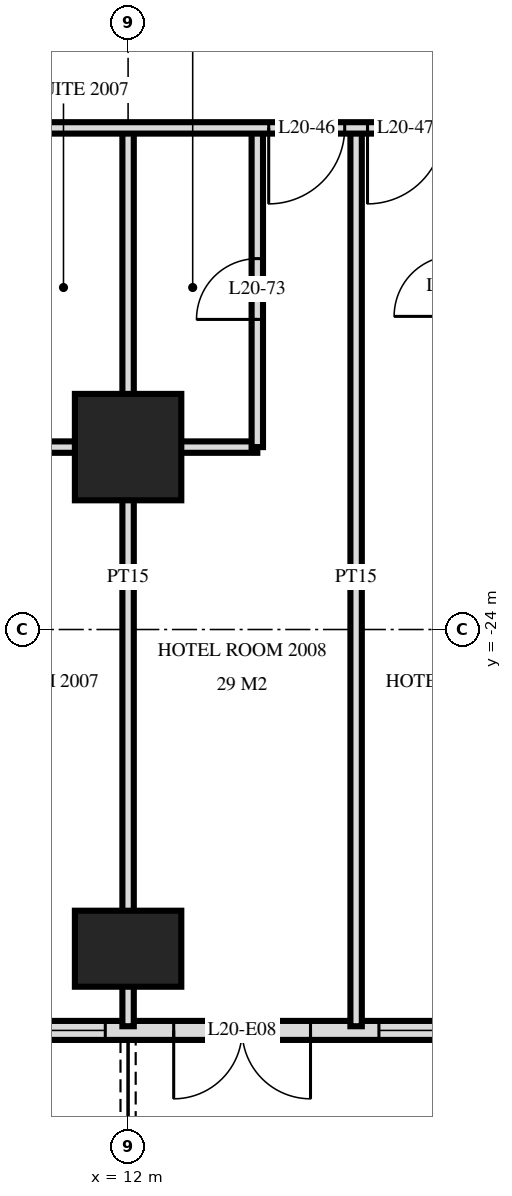
"""IFC4 building model, lengths in metres.
Left out: names, types, materials, properties, quantities, classifications, styles, units other than length and angle.
Written with IfcOpenShell. Run it as: python <this file> out.ifc"""

import sys

from ifc_helpers import new_model, si_unit, direction, frame, frame_2d, origin, origin_2d, place, context, subcontext, project, spatial, rectangle, extrude, element, fill, save


model = new_model("IFC4")
c1 = context("Model", 3, precision=1e-05, world=origin(), true_north=direction((0.0, 1.0)))
c2 = subcontext(c1, "Body", "Model", "MODEL_VIEW")
j1 = project(units=[si_unit("LENGTHUNIT", "METRE"), si_unit("PLANEANGLEUNIT", "RADIAN")], contexts=[c1])
p1 = place(None, origin())
s1 = spatial("IfcSite", under=j1, at=p1, CompositionType="ELEMENT")
p2 = place(p1, origin())
s2 = spatial("IfcBuilding", under=s1, at=p2, CompositionType="ELEMENT")
p3 = place(p2, frame((0.0, 0.0, 81.6)))
s3 = spatial("IfcBuildingStorey", under=s2, at=p3, CompositionType="ELEMENT", Elevation=81.6)
p4 = place(p3, frame((12.0, -28.2, 0.0), z_axis=(0.0, 0.0, 1.0), x_axis=(1.0, 0.0, 0.0)))
e1 = element("IfcColumn", 1, at=p4, inside=s3, PredefinedType="COLUMN", context=c2, shape_type="SweptSolid", body=[
    extrude(rectangle(XDim=1.4, YDim=1.0, at=origin_2d()), origin(), (0.0, 0.0, 1.0), 3.6),
])
p5 = place(p3, frame((12.0, -21.6, 0.0), z_axis=(0.0, 0.0, 1.0), x_axis=(1.0, 0.0, 0.0)))
e2 = element("IfcColumn", 2, at=p5, inside=s3, PredefinedType="COLUMN", context=c2, shape_type="SweptSolid", body=[
    extrude(rectangle(XDim=1.4, YDim=1.4, at=origin_2d()), origin(), (0.0, 0.0, 1.0), 3.6),
])
p6 = place(p3, frame((-28.775, -29.275, 0.0), z_axis=(0.0, 0.0, 1.0), x_axis=(1.0, 0.0, 0.0)))
e3 = element("IfcWall", 3, at=p6, inside=s3, PredefinedType="SOLIDWALL", context=c2, shape_type="SweptSolid", body=[
    extrude(rectangle(XDim=57.551, YDim=0.25, at=frame_2d((28.775, 0.0))), origin(), (0.0, 0.0, 1.0), 3.32),
])
p7 = place(p6, frame((0.575, 0.0, 0.0)))
e4 = element("IfcOpeningElement", 4, at=p7, cuts=e3, PredefinedType="OPENING", context=c2, shape_type="SweptSolid", body=[
    extrude(rectangle(XDim=1.8, YDim=2.4, at=frame_2d((0.9, 1.2))), frame((0.0, 0.135, 0.0), z_axis=(0.0, -1.0, 0.0), x_axis=(1.0, 0.0, 0.0)), (0.0, 0.0, 1.0), 0.27),
])
p8 = place(p6, frame((5.375, 0.0, 0.0)))
e5 = element("IfcOpeningElement", 5, at=p8, cuts=e3, PredefinedType="OPENING", context=c2, shape_type="SweptSolid", body=[
    extrude(rectangle(XDim=1.8, YDim=2.4, at=frame_2d((0.9, 1.2))), frame((0.0, 0.135, 0.0), z_axis=(0.0, -1.0, 0.0), x_axis=(1.0, 0.0, 0.0)), (0.0, 0.0, 1.0), 0.27),
])
p9 = place(p6, frame((8.075, 0.0, 0.3)))
e6 = element("IfcOpeningElement", 6, at=p9, cuts=e3, PredefinedType="OPENING", context=c2, shape_type="SweptSolid", body=[
    extrude(rectangle(XDim=2.4, YDim=2.1, at=frame_2d((1.2, 1.05))), frame((0.0, 0.135, 0.0), z_axis=(0.0, -1.0, 0.0), x_axis=(1.0, 0.0, 0.0)), (0.0, 0.0, 1.0), 0.27),
])
p10 = place(p6, frame((12.875, 0.0, 0.0)))
e7 = element("IfcOpeningElement", 7, at=p10, cuts=e3, PredefinedType="OPENING", context=c2, shape_type="SweptSolid", body=[
    extrude(rectangle(XDim=1.8, YDim=2.4, at=frame_2d((0.9, 1.2))), frame((0.0, 0.135, 0.0), z_axis=(0.0, -1.0, 0.0), x_axis=(1.0, 0.0, 0.0)), (0.0, 0.0, 1.0), 0.27),
])
p11 = place(p6, frame((17.375, 0.0, 0.0)))
e8 = element("IfcOpeningElement", 8, at=p11, cuts=e3, PredefinedType="OPENING", context=c2, shape_type="SweptSolid", body=[
    extrude(rectangle(XDim=1.8, YDim=2.4, at=frame_2d((0.9, 1.2))), frame((0.0, 0.135, 0.0), z_axis=(0.0, -1.0, 0.0), x_axis=(1.0, 0.0, 0.0)), (0.0, 0.0, 1.0), 0.27),
])
p12 = place(p6, frame((20.075, 0.0, 0.3)))
e9 = element("IfcOpeningElement", 9, at=p12, cuts=e3, PredefinedType="OPENING", context=c2, shape_type="SweptSolid", body=[
    extrude(rectangle(XDim=2.4, YDim=2.1, at=frame_2d((1.2, 1.05))), frame((0.0, 0.135, 0.0), z_axis=(0.0, -1.0, 0.0), x_axis=(1.0, 0.0, 0.0)), (0.0, 0.0, 1.0), 0.27),
])
p13 = place(p6, frame((23.075, 0.0, 0.3)))
e10 = element("IfcOpeningElement", 10, at=p13, cuts=e3, PredefinedType="OPENING", context=c2, shape_type="SweptSolid", body=[
    extrude(rectangle(XDim=2.4, YDim=2.1, at=frame_2d((1.2, 1.05))), frame((0.0, 0.135, 0.0), z_axis=(0.0, -1.0, 0.0), x_axis=(1.0, 0.0, 0.0)), (0.0, 0.0, 1.0), 0.27),
])
p14 = place(p6, frame((26.375, 0.0, 0.0)))
e11 = element("IfcOpeningElement", 11, at=p14, cuts=e3, PredefinedType="OPENING", context=c2, shape_type="SweptSolid", body=[
    extrude(rectangle(XDim=1.8, YDim=2.4, at=frame_2d((0.9, 1.2))), frame((0.0, 0.135, 0.0), z_axis=(0.0, -1.0, 0.0), x_axis=(1.0, 0.0, 0.0)), (0.0, 0.0, 1.0), 0.27),
])
p15 = place(p6, frame((29.075, 0.0, 0.3)))
e12 = element("IfcOpeningElement", 12, at=p15, cuts=e3, PredefinedType="OPENING", context=c2, shape_type="SweptSolid", body=[
    extrude(rectangle(XDim=2.4, YDim=2.1, at=frame_2d((1.2, 1.05))), frame((0.0, 0.135, 0.0), z_axis=(0.0, -1.0, 0.0), x_axis=(1.0, 0.0, 0.0)), (0.0, 0.0, 1.0), 0.27),
])
p16 = place(p6, frame((32.375, 0.0, 0.0)))
e13 = element("IfcOpeningElement", 13, at=p16, cuts=e3, PredefinedType="OPENING", context=c2, shape_type="SweptSolid", body=[
    extrude(rectangle(XDim=1.8, YDim=2.4, at=frame_2d((0.9, 1.2))), frame((0.0, 0.135, 0.0), z_axis=(0.0, -1.0, 0.0), x_axis=(1.0, 0.0, 0.0)), (0.0, 0.0, 1.0), 0.27),
])
p17 = place(p6, frame((35.375, 0.0, 0.0)))
e14 = element("IfcOpeningElement", 14, at=p17, cuts=e3, PredefinedType="OPENING", context=c2, shape_type="SweptSolid", body=[
    extrude(rectangle(XDim=1.8, YDim=2.4, at=frame_2d((0.9, 1.2))), frame((0.0, 0.135, 0.0), z_axis=(0.0, -1.0, 0.0), x_axis=(1.0, 0.0, 0.0)), (0.0, 0.0, 1.0), 0.27),
])
p18 = place(p6, frame((38.075, 0.0, 0.3)))
e15 = element("IfcOpeningElement", 15, at=p18, cuts=e3, PredefinedType="OPENING", context=c2, shape_type="SweptSolid", body=[
    extrude(rectangle(XDim=2.4, YDim=2.1, at=frame_2d((1.2, 1.05))), frame((0.0, 0.135, 0.0), z_axis=(0.0, -1.0, 0.0), x_axis=(1.0, 0.0, 0.0)), (0.0, 0.0, 1.0), 0.27),
])
p19 = place(p6, frame((41.375, 0.0, 0.0)))
e16 = element("IfcOpeningElement", 16, at=p19, cuts=e3, PredefinedType="OPENING", context=c2, shape_type="SweptSolid", body=[
    extrude(rectangle(XDim=1.8, YDim=2.4, at=frame_2d((0.9, 1.2))), frame((0.0, 0.135, 0.0), z_axis=(0.0, -1.0, 0.0), x_axis=(1.0, 0.0, 0.0)), (0.0, 0.0, 1.0), 0.27),
])
p20 = place(p6, frame((44.075, 0.0, 0.3)))
e17 = element("IfcOpeningElement", 17, at=p20, cuts=e3, PredefinedType="OPENING", context=c2, shape_type="SweptSolid", body=[
    extrude(rectangle(XDim=2.4, YDim=2.1, at=frame_2d((1.2, 1.05))), frame((0.0, 0.135, 0.0), z_axis=(0.0, -1.0, 0.0), x_axis=(1.0, 0.0, 0.0)), (0.0, 0.0, 1.0), 0.27),
])
p21 = place(p6, frame((47.075, 0.0, 0.3)))
e18 = element("IfcOpeningElement", 18, at=p21, cuts=e3, PredefinedType="OPENING", context=c2, shape_type="SweptSolid", body=[
    extrude(rectangle(XDim=2.4, YDim=2.1, at=frame_2d((1.2, 1.05))), frame((0.0, 0.135, 0.0), z_axis=(0.0, -1.0, 0.0), x_axis=(1.0, 0.0, 0.0)), (0.0, 0.0, 1.0), 0.27),
])
p22 = place(p6, frame((50.375, 0.0, 0.0)))
e19 = element("IfcOpeningElement", 19, at=p22, cuts=e3, PredefinedType="OPENING", context=c2, shape_type="SweptSolid", body=[
    extrude(rectangle(XDim=1.8, YDim=2.4, at=frame_2d((0.9, 1.2))), frame((0.0, 0.135, 0.0), z_axis=(0.0, -1.0, 0.0), x_axis=(1.0, 0.0, 0.0)), (0.0, 0.0, 1.0), 0.27),
])
p23 = place(p6, frame((53.375, 0.0, 0.0)))
e20 = element("IfcOpeningElement", 20, at=p23, cuts=e3, PredefinedType="OPENING", context=c2, shape_type="SweptSolid", body=[
    extrude(rectangle(XDim=1.8, YDim=2.4, at=frame_2d((0.9, 1.2))), frame((0.0, 0.135, 0.0), z_axis=(0.0, -1.0, 0.0), x_axis=(1.0, 0.0, 0.0)), (0.0, 0.0, 1.0), 0.27),
])
p24 = place(p3, frame((15.0, -29.22, 0.0), z_axis=(0.0, 0.0, 1.0), x_axis=(0.0, 1.0, 0.0)))
e21 = element("IfcWall", 21, at=p24, inside=s3, PredefinedType="PARTITIONING", context=c2, shape_type="SweptSolid", body=[
    extrude(rectangle(XDim=11.82, YDim=0.15, at=frame_2d((5.91, 0.0))), origin(), (0.0, 0.0, 1.0), 3.32),
])
p25 = place(p3, frame((13.7, -21.6, 0.0), z_axis=(0.0, 0.0, 1.0), x_axis=(0.0, 1.0, 0.0)))
e22 = element("IfcWall", 22, at=p25, inside=s3, PredefinedType="PARTITIONING", context=c2, shape_type="SweptSolid", body=[
    extrude(rectangle(XDim=4.2, YDim=0.15, at=frame_2d((2.1, 0.0))), origin(), (0.0, 0.0, 1.0), 3.32),
])
p26 = place(p25, frame((1.68, 0.0, 0.0)))
e23 = element("IfcOpeningElement", 23, at=p26, cuts=e22, PredefinedType="OPENING", context=c2, shape_type="SweptSolid", body=[
    extrude(rectangle(XDim=0.8, YDim=2.1, at=frame_2d((0.4, 1.05))), frame((0.0, 0.085, 0.0), z_axis=(0.0, -1.0, 0.0), x_axis=(1.0, 0.0, 0.0)), (0.0, 0.0, 1.0), 0.17),
])
p27 = place(p3, frame((12.0, -29.22, 0.0), z_axis=(0.0, 0.0, 1.0), x_axis=(0.0, 1.0, 0.0)))
e24 = element("IfcWall", 24, at=p27, inside=s3, PredefinedType="PARTITIONING", context=c2, shape_type="SweptSolid", body=[
    extrude(rectangle(XDim=11.82, YDim=0.15, at=frame_2d((5.91, 0.0))), origin(), (0.0, 0.0, 1.0), 3.32),
])
p28 = place(p3, frame((10.3, -21.6, 0.0), z_axis=(0.0, 0.0, 1.0), x_axis=(1.0, 0.0, 0.0)))
e25 = element("IfcWall", 25, at=p28, inside=s3, PredefinedType="PARTITIONING", context=c2, shape_type="SweptSolid", body=[
    extrude(rectangle(XDim=3.4, YDim=0.15, at=frame_2d((1.7, 0.0))), origin(), (0.0, 0.0, 1.0), 3.32),
])
p29 = place(p3, frame((-33.12, -17.4, 0.0), z_axis=(0.0, 0.0, 1.0), x_axis=(1.0, 0.0, 0.0)))
e26 = element("IfcWall", 26, at=p29, inside=s3, PredefinedType="PARTITIONING", context=c2, shape_type="SweptSolid", body=[
    extrude(rectangle(XDim=66.24, YDim=0.15, at=frame_2d((33.12, 0.0))), origin(), (0.0, 0.0, 1.0), 3.32),
])
p30 = place(p29, frame((9.27, 0.0, 0.0)))
e27 = element("IfcOpeningElement", 27, at=p30, cuts=e26, PredefinedType="OPENING", context=c2, shape_type="SweptSolid", body=[
    extrude(rectangle(XDim=1.0, YDim=2.1, at=frame_2d((0.5, 1.05))), frame((0.0, 0.085, 0.0), z_axis=(0.0, -1.0, 0.0), x_axis=(1.0, 0.0, 0.0)), (0.0, 0.0, 1.0), 0.17),
])
p31 = place(p29, frame((13.97, 0.0, 0.0)))
e28 = element("IfcOpeningElement", 28, at=p31, cuts=e26, PredefinedType="OPENING", context=c2, shape_type="SweptSolid", body=[
    extrude(rectangle(XDim=1.0, YDim=2.1, at=frame_2d((0.5, 1.05))), frame((0.0, 0.085, 0.0), z_axis=(0.0, -1.0, 0.0), x_axis=(1.0, 0.0, 0.0)), (0.0, 0.0, 1.0), 0.17),
])
p32 = place(p29, frame((17.62, 0.0, 0.0)))
e29 = element("IfcOpeningElement", 29, at=p32, cuts=e26, PredefinedType="OPENING", context=c2, shape_type="SweptSolid", body=[
    extrude(rectangle(XDim=1.0, YDim=2.1, at=frame_2d((0.5, 1.05))), frame((0.0, 0.085, 0.0), z_axis=(0.0, -1.0, 0.0), x_axis=(1.0, 0.0, 0.0)), (0.0, 0.0, 1.0), 0.17),
])
p33 = place(p29, frame((21.27, 0.0, 0.0)))
e30 = element("IfcOpeningElement", 30, at=p33, cuts=e26, PredefinedType="OPENING", context=c2, shape_type="SweptSolid", body=[
    extrude(rectangle(XDim=1.0, YDim=2.1, at=frame_2d((0.5, 1.05))), frame((0.0, 0.085, 0.0), z_axis=(0.0, -1.0, 0.0), x_axis=(1.0, 0.0, 0.0)), (0.0, 0.0, 1.0), 0.17),
])
p34 = place(p29, frame((25.97, 0.0, 0.0)))
e31 = element("IfcOpeningElement", 31, at=p34, cuts=e26, PredefinedType="OPENING", context=c2, shape_type="SweptSolid", body=[
    extrude(rectangle(XDim=1.0, YDim=2.1, at=frame_2d((0.5, 1.05))), frame((0.0, 0.085, 0.0), z_axis=(0.0, -1.0, 0.0), x_axis=(1.0, 0.0, 0.0)), (0.0, 0.0, 1.0), 0.17),
])
p35 = place(p29, frame((35.62, 0.0, 0.0)))
e32 = element("IfcOpeningElement", 32, at=p35, cuts=e26, PredefinedType="OPENING", context=c2, shape_type="SweptSolid", body=[
    extrude(rectangle(XDim=1.0, YDim=2.1, at=frame_2d((0.5, 1.05))), frame((0.0, 0.085, 0.0), z_axis=(0.0, -1.0, 0.0), x_axis=(1.0, 0.0, 0.0)), (0.0, 0.0, 1.0), 0.17),
])
p36 = place(p29, frame((40.97, 0.0, 0.0)))
e33 = element("IfcOpeningElement", 33, at=p36, cuts=e26, PredefinedType="OPENING", context=c2, shape_type="SweptSolid", body=[
    extrude(rectangle(XDim=1.0, YDim=2.1, at=frame_2d((0.5, 1.05))), frame((0.0, 0.085, 0.0), z_axis=(0.0, -1.0, 0.0), x_axis=(1.0, 0.0, 0.0)), (0.0, 0.0, 1.0), 0.17),
])
p37 = place(p29, frame((42.27, 0.0, 0.0)))
e34 = element("IfcOpeningElement", 34, at=p37, cuts=e26, PredefinedType="OPENING", context=c2, shape_type="SweptSolid", body=[
    extrude(rectangle(XDim=1.0, YDim=2.1, at=frame_2d((0.5, 1.05))), frame((0.0, 0.085, 0.0), z_axis=(0.0, -1.0, 0.0), x_axis=(1.0, 0.0, 0.0)), (0.0, 0.0, 1.0), 0.17),
])
p38 = place(p29, frame((46.97, 0.0, 0.0)))
e35 = element("IfcOpeningElement", 35, at=p38, cuts=e26, PredefinedType="OPENING", context=c2, shape_type="SweptSolid", body=[
    extrude(rectangle(XDim=1.0, YDim=2.1, at=frame_2d((0.5, 1.05))), frame((0.0, 0.085, 0.0), z_axis=(0.0, -1.0, 0.0), x_axis=(1.0, 0.0, 0.0)), (0.0, 0.0, 1.0), 0.17),
])
p39 = place(p29, frame((48.27, 0.0, 0.0)))
e36 = element("IfcOpeningElement", 36, at=p39, cuts=e26, PredefinedType="OPENING", context=c2, shape_type="SweptSolid", body=[
    extrude(rectangle(XDim=1.0, YDim=2.1, at=frame_2d((0.5, 1.05))), frame((0.0, 0.085, 0.0), z_axis=(0.0, -1.0, 0.0), x_axis=(1.0, 0.0, 0.0)), (0.0, 0.0, 1.0), 0.17),
])
p40 = place(p29, frame((1.87, 0.0, 0.0)))
e37 = element("IfcOpeningElement", 37, at=p40, cuts=e26, PredefinedType="OPENING", context=c2, shape_type="SweptSolid", body=[
    extrude(rectangle(XDim=1.0, YDim=2.1, at=frame_2d((0.5, 1.05))), frame((0.0, 0.085, 0.0), z_axis=(0.0, -1.0, 0.0), x_axis=(1.0, 0.0, 0.0)), (0.0, 0.0, 1.0), 0.17),
])
p41 = place(p29, frame((60.37, 0.0, 0.0)))
e38 = element("IfcOpeningElement", 38, at=p41, cuts=e26, PredefinedType="OPENING", context=c2, shape_type="SweptSolid", body=[
    extrude(rectangle(XDim=1.0, YDim=2.1, at=frame_2d((0.5, 1.05))), frame((0.0, 0.085, 0.0), z_axis=(0.0, -1.0, 0.0), x_axis=(1.0, 0.0, 0.0)), (0.0, 0.0, 1.0), 0.17),
])
p42 = place(p18, origin())
e39 = element("IfcWindow", 39, at=p42, inside=s3, PartitioningType="SINGLE_PANEL", PredefinedType="WINDOW", context=c2, shape_type="SweptSolid", body=[
    extrude(rectangle(XDim=2.4, YDim=2.1, at=frame_2d((1.2, 1.05))), frame((0.0, 0.03, 0.0), z_axis=(0.0, -1.0, 0.0), x_axis=(1.0, 0.0, 0.0)), (0.0, 0.0, 1.0), 0.06),
])
fill(e15, e39)
p43 = place(p19, frame((0.9, 0.0, 0.0), z_axis=(0.0, 0.0, 1.0), x_axis=(-1.0, 0.0, 0.0)))
e40 = element("IfcDoor", 40, at=p43, inside=s3, OperationType="DOUBLE_DOOR_SINGLE_SWING", PredefinedType="DOOR", context=c2, shape_type="SweptSolid", body=[
    extrude(rectangle(XDim=1.8, YDim=2.4, at=frame_2d((0.0, 1.2))), frame((0.0, -0.025, 0.0), z_axis=(0.0, 1.0, 0.0), x_axis=(-1.0, 0.0, 0.0)), (0.0, 0.0, 1.0), 0.05),
])
fill(e16, e40)
p44 = place(p20, origin())
e41 = element("IfcWindow", 41, at=p44, inside=s3, PartitioningType="SINGLE_PANEL", PredefinedType="WINDOW", context=c2, shape_type="SweptSolid", body=[
    extrude(rectangle(XDim=2.4, YDim=2.1, at=frame_2d((1.2, 1.05))), frame((0.0, 0.03, 0.0), z_axis=(0.0, -1.0, 0.0), x_axis=(1.0, 0.0, 0.0)), (0.0, 0.0, 1.0), 0.06),
])
fill(e17, e41)
p45 = place(p38, frame((0.5, 0.0, 0.0), z_axis=(0.0, 0.0, 1.0), x_axis=(-1.0, 0.0, 0.0)))
e42 = element("IfcDoor", 42, at=p45, inside=s3, OperationType="SINGLE_SWING_LEFT", PredefinedType="DOOR", context=c2, shape_type="SweptSolid", body=[
    extrude(rectangle(XDim=1.0, YDim=2.1, at=frame_2d((0.0, 1.05))), frame((0.0, -0.025, 0.0), z_axis=(0.0, 1.0, 0.0), x_axis=(-1.0, 0.0, 0.0)), (0.0, 0.0, 1.0), 0.05),
])
fill(e35, e42)
p46 = place(p39, frame((0.5, 0.0, 0.0), z_axis=(0.0, 0.0, 1.0), x_axis=(-1.0, 0.0, 0.0)))
e43 = element("IfcDoor", 43, at=p46, inside=s3, OperationType="SINGLE_SWING_LEFT", PredefinedType="DOOR", context=c2, shape_type="SweptSolid", body=[
    extrude(rectangle(XDim=1.0, YDim=2.1, at=frame_2d((0.0, 1.05))), frame((0.0, -0.025, 0.0), z_axis=(0.0, 1.0, 0.0), x_axis=(-1.0, 0.0, 0.0)), (0.0, 0.0, 1.0), 0.05),
])
fill(e36, e43)
p47 = place(p26, origin())
e44 = element("IfcDoor", 44, at=p47, inside=s3, OperationType="SINGLE_SWING_RIGHT", PredefinedType="DOOR", context=c2, shape_type="SweptSolid", body=[
    extrude(rectangle(XDim=0.8, YDim=2.1, at=frame_2d((0.4, 1.05))), frame((0.0, 0.025, 0.0), z_axis=(0.0, -1.0, 0.0), x_axis=(1.0, 0.0, 0.0)), (0.0, 0.0, 1.0), 0.05),
])
fill(e23, e44)
save(model, sys.argv[1])
